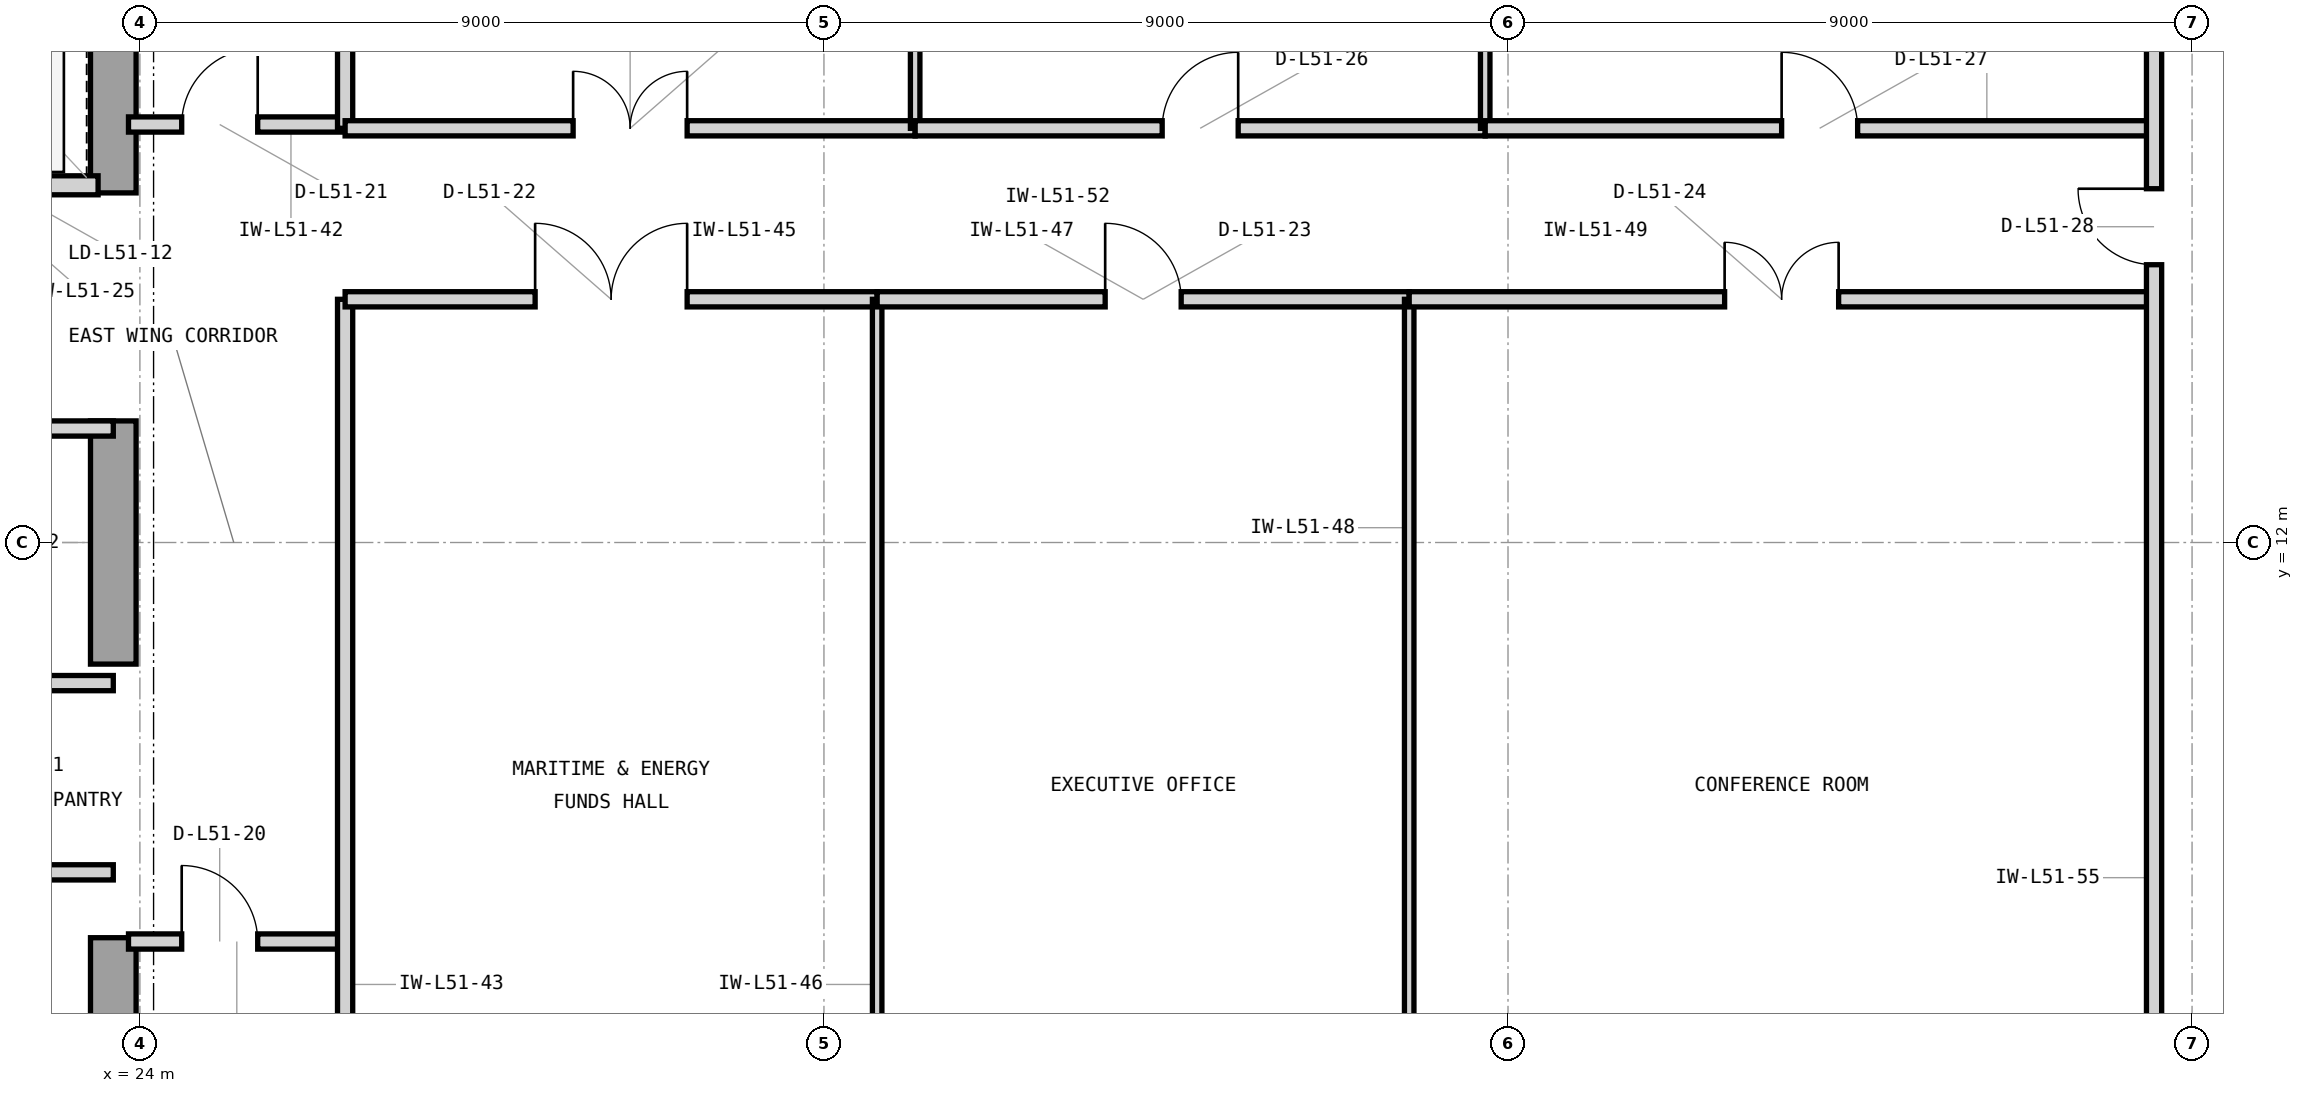
"""IFC4 building model, lengths in metres.
Left out: names, types, materials, properties, quantities, classifications, styles, units other than length and angle.
Written with IfcOpenShell. Run it as: python <this file> out.ifc"""

import sys

from ifc_helpers import new_model, si_unit, direction, frame, frame_2d, origin, place, context, subcontext, project, spatial, rectangle, extrude, element, fill, save


model = new_model("IFC4")
c1 = context("Model", 3, precision=1e-05, world=origin(), true_north=direction((0.0, 1.0)))
c2 = subcontext(c1, "Body", "Model", "MODEL_VIEW")
j1 = project(units=[si_unit("LENGTHUNIT", "METRE"), si_unit("PLANEANGLEUNIT", "RADIAN")], contexts=[c1])
p1 = place(None, origin())
s1 = spatial("IfcSite", under=j1, at=p1, CompositionType="ELEMENT")
p2 = place(p1, origin())
s2 = spatial("IfcBuilding", under=s1, at=p2, CompositionType="ELEMENT")
p3 = place(p2, frame((0.0, 0.0, 211.2)))
s3 = spatial("IfcBuildingStorey", under=s2, at=p3, CompositionType="ELEMENT", Elevation=211.2)
p4 = place(p3, frame((23.65, 3.65, 0.0), z_axis=(0.0, 0.0, 1.0), x_axis=(0.0, 1.0, 0.0)))
e1 = element("IfcWall", 1, at=p4, inside=s3, PredefinedType="SHEAR", context=c2, shape_type="SweptSolid", body=[
    extrude(rectangle(XDim=3.15, YDim=0.6, at=frame_2d((1.575, 0.0))), origin(), (0.0, 0.0, 1.0), 3.9),
])
p5 = place(p3, frame((23.65, 10.4, 0.0), z_axis=(0.0, 0.0, 1.0), x_axis=(0.0, 1.0, 0.0)))
e2 = element("IfcWall", 2, at=p5, inside=s3, PredefinedType="SHEAR", context=c2, shape_type="SweptSolid", body=[
    extrude(rectangle(XDim=3.2, YDim=0.6, at=frame_2d((1.6, 0.0))), origin(), (0.0, 0.0, 1.0), 3.9),
])
p6 = place(p3, frame((23.65, 16.6, 0.0), z_axis=(0.0, 0.0, 1.0), x_axis=(0.0, 1.0, 0.0)))
e3 = element("IfcWall", 3, at=p6, inside=s3, PredefinedType="SHEAR", context=c2, shape_type="SweptSolid", body=[
    extrude(rectangle(XDim=4.05, YDim=0.6, at=frame_2d((2.025, 0.0))), origin(), (0.0, 0.0, 1.0), 3.9),
])
p7 = place(p3, frame((21.05, 16.7, 0.0), z_axis=(0.0, 0.0, 1.0), x_axis=(1.0, 0.0, 0.0)))
e4 = element("IfcWall", 4, at=p7, inside=s3, PredefinedType="PARTITIONING", context=c2, shape_type="SweptSolid", body=[
    extrude(rectangle(XDim=2.4, YDim=0.25, at=frame_2d((1.2, 0.0))), origin(), (0.0, 0.0, 1.0), 3.283),
])
p8 = place(p7, frame((0.52, 0.0, 0.0)))
e5 = element("IfcOpeningElement", 5, at=p8, cuts=e4, PredefinedType="OPENING", context=c2, shape_type="SweptSolid", body=[
    extrude(rectangle(XDim=1.15, YDim=2.25, at=frame_2d((0.575, 1.125))), frame((0.0, 0.135, 0.0), z_axis=(0.0, -1.0, 0.0), x_axis=(1.0, 0.0, 0.0)), (0.0, 0.0, 1.0), 0.27),
])
p9 = place(p3, frame((20.8, 7.66, 0.0), z_axis=(0.0, 0.0, 1.0), x_axis=(1.0, 0.0, 0.0)))
e6 = element("IfcWall", 6, at=p9, inside=s3, PredefinedType="PARTITIONING", context=c2, shape_type="SweptSolid", body=[
    extrude(rectangle(XDim=2.85, YDim=0.2, at=frame_2d((1.425, 0.0))), origin(), (0.0, 0.0, 1.0), 3.69),
])
p10 = place(p9, frame((0.95, 0.0, 0.0)))
e7 = element("IfcOpeningElement", 7, at=p10, cuts=e6, PredefinedType="OPENING", context=c2, shape_type="SweptSolid", body=[
    extrude(rectangle(XDim=0.95, YDim=2.1, at=frame_2d((0.475, 1.05))), frame((0.0, 0.11, 0.0), z_axis=(0.0, -1.0, 0.0), x_axis=(1.0, 0.0, 0.0)), (0.0, 0.0, 1.0), 0.22),
])
p11 = place(p3, frame((14.825, 10.15, 0.0), z_axis=(0.0, 0.0, 1.0), x_axis=(1.0, 0.0, 0.0)))
e8 = element("IfcWall", 8, at=p11, inside=s3, PredefinedType="PARTITIONING", context=c2, shape_type="SweptSolid", body=[
    extrude(rectangle(XDim=8.825, YDim=0.2, at=frame_2d((4.413, 0.0))), origin(), (0.0, 0.0, 1.0), 3.69),
])
p12 = place(p3, frame((18.5, 13.5, 0.0), z_axis=(0.0, 0.0, 1.0), x_axis=(1.0, 0.0, 0.0)))
e9 = element("IfcWall", 9, at=p12, inside=s3, PredefinedType="PARTITIONING", context=c2, shape_type="SweptSolid", body=[
    extrude(rectangle(XDim=5.15, YDim=0.2, at=frame_2d((2.575, 0.0))), origin(), (0.0, 0.0, 1.0), 3.283),
])
p13 = place(p12, frame((2.1, 0.0, 0.0)))
e10 = element("IfcOpeningElement", 10, at=p13, cuts=e9, PredefinedType="OPENING", context=c2, shape_type="SweptSolid", body=[
    extrude(rectangle(XDim=0.95, YDim=2.1, at=frame_2d((0.475, 1.05))), frame((0.0, 0.11, 0.0), z_axis=(0.0, -1.0, 0.0), x_axis=(1.0, 0.0, 0.0)), (0.0, 0.0, 1.0), 0.22),
])
p14 = place(p3, frame((23.85, 6.75, 0.0), z_axis=(0.0, 0.0, 1.0), x_axis=(1.0, 0.0, 0.0)))
e11 = element("IfcWall", 11, at=p14, inside=s3, PredefinedType="PARTITIONING", context=c2, shape_type="SweptSolid", body=[
    extrude(rectangle(XDim=2.85, YDim=0.2, at=frame_2d((1.425, 0.0))), origin(), (0.0, 0.0, 1.0), 3.69),
])
p15 = place(p14, frame((0.7, 0.0, 0.0)))
e12 = element("IfcOpeningElement", 12, at=p15, cuts=e11, PredefinedType="OPENING", context=c2, shape_type="SweptSolid", body=[
    extrude(rectangle(XDim=1.0, YDim=2.15, at=frame_2d((0.5, 1.075))), frame((0.0, 0.11, 0.0), z_axis=(0.0, -1.0, 0.0), x_axis=(1.0, 0.0, 0.0)), (0.0, 0.0, 1.0), 0.22),
])
p16 = place(p3, frame((23.85, 17.5, 0.0), z_axis=(0.0, 0.0, 1.0), x_axis=(1.0, 0.0, 0.0)))
e13 = element("IfcWall", 13, at=p16, inside=s3, PredefinedType="PARTITIONING", context=c2, shape_type="SweptSolid", body=[
    extrude(rectangle(XDim=2.85, YDim=0.2, at=frame_2d((1.425, 0.0))), origin(), (0.0, 0.0, 1.0), 3.69),
])
p17 = place(p16, frame((0.7, 0.0, 0.0)))
e14 = element("IfcOpeningElement", 14, at=p17, cuts=e13, PredefinedType="OPENING", context=c2, shape_type="SweptSolid", body=[
    extrude(rectangle(XDim=1.0, YDim=2.15, at=frame_2d((0.5, 1.075))), frame((0.0, 0.11, 0.0), z_axis=(0.0, -1.0, 0.0), x_axis=(1.0, 0.0, 0.0)), (0.0, 0.0, 1.0), 0.22),
])
p18 = place(p3, frame((26.7, 3.18, 0.0), z_axis=(0.0, 0.0, 1.0), x_axis=(0.0, 1.0, 0.0)))
e15 = element("IfcWall", 15, at=p18, inside=s3, PredefinedType="PARTITIONING", context=c2, shape_type="SweptSolid", body=[
    extrude(rectangle(XDim=12.02, YDim=0.2, at=frame_2d((6.01, 0.0))), origin(), (0.0, 0.0, 1.0), 3.69),
])
p19 = place(p3, frame((26.7, 17.45, 0.0), z_axis=(0.0, 0.0, 1.0), x_axis=(0.0, 1.0, 0.0)))
e16 = element("IfcWall", 16, at=p19, inside=s3, PredefinedType="PARTITIONING", context=c2, shape_type="SweptSolid", body=[
    extrude(rectangle(XDim=3.37, YDim=0.2, at=frame_2d((1.685, 0.0))), origin(), (0.0, 0.0, 1.0), 3.69),
])
p20 = place(p3, frame((26.7, 15.2, 0.0), z_axis=(0.0, 0.0, 1.0), x_axis=(1.0, 0.0, 0.0)))
e17 = element("IfcWall", 17, at=p20, inside=s3, PredefinedType="PARTITIONING", context=c2, shape_type="SweptSolid", body=[
    extrude(rectangle(XDim=7.0, YDim=0.2, at=frame_2d((3.5, 0.0))), origin(), (0.0, 0.0, 1.0), 3.69),
])
p21 = place(p20, frame((2.5, 0.0, 0.0)))
e18 = element("IfcOpeningElement", 18, at=p21, cuts=e17, PredefinedType="OPENING", context=c2, shape_type="SweptSolid", body=[
    extrude(rectangle(XDim=2.0, YDim=2.5, at=frame_2d((1.0, 1.25))), frame((0.0, 0.11, 0.0), z_axis=(0.0, -1.0, 0.0), x_axis=(1.0, 0.0, 0.0)), (0.0, 0.0, 1.0), 0.22),
])
p22 = place(p3, frame((33.7, 3.18, 0.0), z_axis=(0.0, 0.0, 1.0), x_axis=(0.0, 1.0, 0.0)))
e19 = element("IfcWall", 19, at=p22, inside=s3, PredefinedType="PARTITIONING", context=c2, shape_type="SweptSolid", body=[
    extrude(rectangle(XDim=12.02, YDim=0.125, at=frame_2d((6.01, 0.0))), origin(), (0.0, 0.0, 1.0), 3.69),
])
p23 = place(p3, frame((33.7, 15.2, 0.0), z_axis=(0.0, 0.0, 1.0), x_axis=(1.0, 0.0, 0.0)))
e20 = element("IfcWall", 20, at=p23, inside=s3, PredefinedType="PARTITIONING", context=c2, shape_type="SweptSolid", body=[
    extrude(rectangle(XDim=7.0, YDim=0.2, at=frame_2d((3.5, 0.0))), origin(), (0.0, 0.0, 1.0), 3.69),
])
p24 = place(p23, frame((3.0, 0.0, 0.0)))
e21 = element("IfcOpeningElement", 21, at=p24, cuts=e20, PredefinedType="OPENING", context=c2, shape_type="SweptSolid", body=[
    extrude(rectangle(XDim=1.0, YDim=2.15, at=frame_2d((0.5, 1.075))), frame((0.0, 0.11, 0.0), z_axis=(0.0, -1.0, 0.0), x_axis=(1.0, 0.0, 0.0)), (0.0, 0.0, 1.0), 0.22),
])
p25 = place(p3, frame((40.7, 3.18, 0.0), z_axis=(0.0, 0.0, 1.0), x_axis=(0.0, 1.0, 0.0)))
e22 = element("IfcWall", 22, at=p25, inside=s3, PredefinedType="PARTITIONING", context=c2, shape_type="SweptSolid", body=[
    extrude(rectangle(XDim=12.02, YDim=0.125, at=frame_2d((6.01, 0.0))), origin(), (0.0, 0.0, 1.0), 3.69),
])
p26 = place(p3, frame((40.7, 15.2, 0.0), z_axis=(0.0, 0.0, 1.0), x_axis=(1.0, 0.0, 0.0)))
e23 = element("IfcWall", 23, at=p26, inside=s3, PredefinedType="PARTITIONING", context=c2, shape_type="SweptSolid", body=[
    extrude(rectangle(XDim=9.8, YDim=0.2, at=frame_2d((4.9, 0.0))), origin(), (0.0, 0.0, 1.0), 3.69),
])
p27 = place(p26, frame((4.15, 0.0, 0.0)))
e24 = element("IfcOpeningElement", 24, at=p27, cuts=e23, PredefinedType="OPENING", context=c2, shape_type="SweptSolid", body=[
    extrude(rectangle(XDim=1.5, YDim=2.3, at=frame_2d((0.75, 1.15))), frame((0.0, 0.11, 0.0), z_axis=(0.0, -1.0, 0.0), x_axis=(1.0, 0.0, 0.0)), (0.0, 0.0, 1.0), 0.22),
])
p28 = place(p3, frame((26.7, 17.45, 0.0), z_axis=(0.0, 0.0, 1.0), x_axis=(1.0, 0.0, 0.0)))
e25 = element("IfcWall", 25, at=p28, inside=s3, PredefinedType="PARTITIONING", context=c2, shape_type="SweptSolid", body=[
    extrude(rectangle(XDim=7.5, YDim=0.2, at=frame_2d((3.75, 0.0))), origin(), (0.0, 0.0, 1.0), 3.69),
])
p29 = place(p28, frame((3.0, 0.0, 0.0)))
e26 = element("IfcOpeningElement", 26, at=p29, cuts=e25, PredefinedType="OPENING", context=c2, shape_type="SweptSolid", body=[
    extrude(rectangle(XDim=1.5, YDim=2.3, at=frame_2d((0.75, 1.15))), frame((0.0, 0.11, 0.0), z_axis=(0.0, -1.0, 0.0), x_axis=(1.0, 0.0, 0.0)), (0.0, 0.0, 1.0), 0.22),
])
p30 = place(p3, frame((34.2, 17.45, 0.0), z_axis=(0.0, 0.0, 1.0), x_axis=(0.0, 1.0, 0.0)))
e27 = element("IfcWall", 27, at=p30, inside=s3, PredefinedType="PARTITIONING", context=c2, shape_type="SweptSolid", body=[
    extrude(rectangle(XDim=3.37, YDim=0.125, at=frame_2d((1.685, 0.0))), origin(), (0.0, 0.0, 1.0), 3.69),
])
p31 = place(p3, frame((34.2, 17.45, 0.0), z_axis=(0.0, 0.0, 1.0), x_axis=(1.0, 0.0, 0.0)))
e28 = element("IfcWall", 28, at=p31, inside=s3, PredefinedType="PARTITIONING", context=c2, shape_type="SweptSolid", body=[
    extrude(rectangle(XDim=7.5, YDim=0.2, at=frame_2d((3.75, 0.0))), origin(), (0.0, 0.0, 1.0), 3.69),
])
p32 = place(p31, frame((3.25, 0.0, 0.0)))
e29 = element("IfcOpeningElement", 29, at=p32, cuts=e28, PredefinedType="OPENING", context=c2, shape_type="SweptSolid", body=[
    extrude(rectangle(XDim=1.0, YDim=2.15, at=frame_2d((0.5, 1.075))), frame((0.0, 0.11, 0.0), z_axis=(0.0, -1.0, 0.0), x_axis=(1.0, 0.0, 0.0)), (0.0, 0.0, 1.0), 0.22),
])
p33 = place(p3, frame((41.7, 17.45, 0.0), z_axis=(0.0, 0.0, 1.0), x_axis=(0.0, 1.0, 0.0)))
e30 = element("IfcWall", 30, at=p33, inside=s3, PredefinedType="PARTITIONING", context=c2, shape_type="SweptSolid", body=[
    extrude(rectangle(XDim=3.37, YDim=0.125, at=frame_2d((1.685, 0.0))), origin(), (0.0, 0.0, 1.0), 3.69),
])
p34 = place(p3, frame((41.7, 17.45, 0.0), z_axis=(0.0, 0.0, 1.0), x_axis=(1.0, 0.0, 0.0)))
e31 = element("IfcWall", 31, at=p34, inside=s3, PredefinedType="PARTITIONING", context=c2, shape_type="SweptSolid", body=[
    extrude(rectangle(XDim=8.8, YDim=0.2, at=frame_2d((4.4, 0.0))), origin(), (0.0, 0.0, 1.0), 3.69),
])
p35 = place(p34, frame((3.9, 0.0, 0.0)))
e32 = element("IfcOpeningElement", 32, at=p35, cuts=e31, PredefinedType="OPENING", context=c2, shape_type="SweptSolid", body=[
    extrude(rectangle(XDim=1.0, YDim=2.15, at=frame_2d((0.5, 1.075))), frame((0.0, 0.11, 0.0), z_axis=(0.0, -1.0, 0.0), x_axis=(1.0, 0.0, 0.0)), (0.0, 0.0, 1.0), 0.22),
])
p36 = place(p3, frame((50.5, 3.18, 0.0), z_axis=(0.0, 0.0, 1.0), x_axis=(0.0, 1.0, 0.0)))
e33 = element("IfcWall", 33, at=p36, inside=s3, PredefinedType="PARTITIONING", context=c2, shape_type="SweptSolid", body=[
    extrude(rectangle(XDim=17.64, YDim=0.2, at=frame_2d((8.82, 0.0))), origin(), (0.0, 0.0, 1.0), 3.69),
])
p37 = place(p36, frame((12.475, 0.0, 0.0)))
e34 = element("IfcOpeningElement", 34, at=p37, cuts=e33, PredefinedType="OPENING", context=c2, shape_type="SweptSolid", body=[
    extrude(rectangle(XDim=1.0, YDim=2.15, at=frame_2d((0.5, 1.075))), frame((0.0, 0.11, 0.0), z_axis=(0.0, -1.0, 0.0), x_axis=(1.0, 0.0, 0.0)), (0.0, 0.0, 1.0), 0.22),
])
p38 = place(p15, origin())
e35 = element("IfcDoor", 35, at=p38, inside=s3, OperationType="SINGLE_SWING_LEFT", PredefinedType="DOOR", context=c2, shape_type="SweptSolid", body=[
    extrude(rectangle(XDim=1.0, YDim=2.15, at=frame_2d((0.5, 1.075))), frame((0.0, 0.025, 0.0), z_axis=(0.0, -1.0, 0.0), x_axis=(1.0, 0.0, 0.0)), (0.0, 0.0, 1.0), 0.05),
])
fill(e12, e35)
p39 = place(p17, origin())
e36 = element("IfcDoor", 36, at=p39, inside=s3, OperationType="SINGLE_SWING_RIGHT", PredefinedType="DOOR", context=c2, shape_type="SweptSolid", body=[
    extrude(rectangle(XDim=1.0, YDim=2.15, at=frame_2d((0.5, 1.075))), frame((0.0, 0.025, 0.0), z_axis=(0.0, -1.0, 0.0), x_axis=(1.0, 0.0, 0.0)), (0.0, 0.0, 1.0), 0.05),
])
fill(e14, e36)
p40 = place(p21, origin())
e37 = element("IfcDoor", 37, at=p40, inside=s3, OperationType="DOUBLE_DOOR_SINGLE_SWING", PredefinedType="DOOR", context=c2, shape_type="SweptSolid", body=[
    extrude(rectangle(XDim=2.0, YDim=2.5, at=frame_2d((1.0, 1.25))), frame((0.0, 0.025, 0.0), z_axis=(0.0, -1.0, 0.0), x_axis=(1.0, 0.0, 0.0)), (0.0, 0.0, 1.0), 0.05),
])
fill(e18, e37)
p41 = place(p24, origin())
e38 = element("IfcDoor", 38, at=p41, inside=s3, OperationType="SINGLE_SWING_LEFT", PredefinedType="DOOR", context=c2, shape_type="SweptSolid", body=[
    extrude(rectangle(XDim=1.0, YDim=2.15, at=frame_2d((0.5, 1.075))), frame((0.0, 0.025, 0.0), z_axis=(0.0, -1.0, 0.0), x_axis=(1.0, 0.0, 0.0)), (0.0, 0.0, 1.0), 0.05),
])
fill(e21, e38)
p42 = place(p27, origin())
e39 = element("IfcDoor", 39, at=p42, inside=s3, OperationType="DOUBLE_DOOR_SINGLE_SWING", PredefinedType="DOOR", context=c2, shape_type="SweptSolid", body=[
    extrude(rectangle(XDim=1.5, YDim=2.3, at=frame_2d((0.75, 1.15))), frame((0.0, 0.025, 0.0), z_axis=(0.0, -1.0, 0.0), x_axis=(1.0, 0.0, 0.0)), (0.0, 0.0, 1.0), 0.05),
])
fill(e24, e39)
p43 = place(p29, origin())
e40 = element("IfcDoor", 40, at=p43, inside=s3, OperationType="DOUBLE_DOOR_SINGLE_SWING", PredefinedType="DOOR", context=c2, shape_type="SweptSolid", body=[
    extrude(rectangle(XDim=1.5, YDim=2.3, at=frame_2d((0.75, 1.15))), frame((0.0, 0.025, 0.0), z_axis=(0.0, -1.0, 0.0), x_axis=(1.0, 0.0, 0.0)), (0.0, 0.0, 1.0), 0.05),
])
fill(e26, e40)
p44 = place(p32, origin())
e41 = element("IfcDoor", 41, at=p44, inside=s3, OperationType="SINGLE_SWING_RIGHT", PredefinedType="DOOR", context=c2, shape_type="SweptSolid", body=[
    extrude(rectangle(XDim=1.0, YDim=2.15, at=frame_2d((0.5, 1.075))), frame((0.0, 0.025, 0.0), z_axis=(0.0, -1.0, 0.0), x_axis=(1.0, 0.0, 0.0)), (0.0, 0.0, 1.0), 0.05),
])
fill(e29, e41)
p45 = place(p35, origin())
e42 = element("IfcDoor", 42, at=p45, inside=s3, OperationType="SINGLE_SWING_LEFT", PredefinedType="DOOR", context=c2, shape_type="SweptSolid", body=[
    extrude(rectangle(XDim=1.0, YDim=2.15, at=frame_2d((0.5, 1.075))), frame((0.0, 0.025, 0.0), z_axis=(0.0, -1.0, 0.0), x_axis=(1.0, 0.0, 0.0)), (0.0, 0.0, 1.0), 0.05),
])
fill(e32, e42)
p46 = place(p37, origin())
e43 = element("IfcDoor", 43, at=p46, inside=s3, OperationType="SINGLE_SWING_RIGHT", PredefinedType="DOOR", context=c2, shape_type="SweptSolid", body=[
    extrude(rectangle(XDim=1.0, YDim=2.15, at=frame_2d((0.5, 1.075))), frame((0.0, 0.025, 0.0), z_axis=(0.0, -1.0, 0.0), x_axis=(1.0, 0.0, 0.0)), (0.0, 0.0, 1.0), 0.05),
])
fill(e34, e43)
save(model, sys.argv[1])
